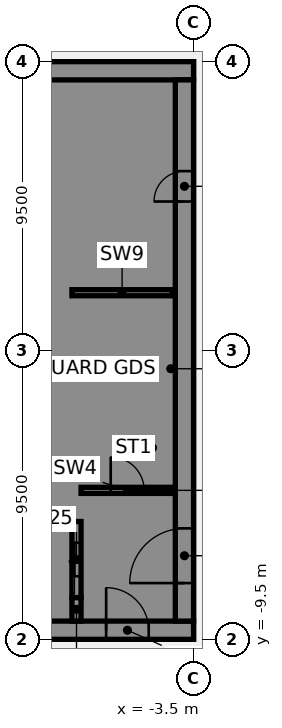
"""IFC4 building model, lengths in metres.
Left out: names, types, materials, properties, quantities, classifications, styles, units other than length and angle.
Written with IfcOpenShell. Run it as: python <this file> out.ifc"""

import sys

from ifc_helpers import new_model, si_unit, direction, frame, frame_2d, origin, place, context, subcontext, project, spatial, polyline, rectangle, outline, extrude, element, fill, save


model = new_model("IFC4")
c1 = context("Model", 3, precision=1e-05, world=origin(), true_north=direction((0.0, 1.0)))
c2 = subcontext(c1, "Body", "Model", "MODEL_VIEW")
j1 = project(units=[si_unit("LENGTHUNIT", "METRE"), si_unit("PLANEANGLEUNIT", "RADIAN")], contexts=[c1])
p1 = place(None, origin())
s1 = spatial("IfcSite", under=j1, at=p1, CompositionType="ELEMENT")
p2 = place(p1, origin())
s2 = spatial("IfcBuilding", under=s1, at=p2, CompositionType="ELEMENT")
p3 = place(p2, frame((0.0, 0.0, 106.0)))
s3 = spatial("IfcBuildingStorey", under=s2, at=p3, CompositionType="ELEMENT", Elevation=106.0)
p4 = place(p3, frame((-16.5, -9.2, 0.0), z_axis=(0.0, 0.0, 1.0), x_axis=(1.0, 0.0, 0.0)))
e1 = element("IfcWall", 1, at=p4, inside=s3, PredefinedType="SHEAR", context=c2, shape_type="SweptSolid", body=[
    extrude(rectangle(XDim=13.0, YDim=0.6, at=frame_2d((6.5, 0.0))), origin(), (0.0, 0.0, 1.0), 3.61),
])
p5 = place(p4, frame((4.15, 0.0, 0.0)))
e2 = element("IfcOpeningElement", 2, at=p5, cuts=e1, PredefinedType="OPENING", context=c2, shape_type="SweptSolid", body=[
    extrude(rectangle(XDim=1.4, YDim=2.1, at=frame_2d((0.7, 1.05))), frame((0.0, 0.31, 0.0), z_axis=(0.0, -1.0, 0.0), x_axis=(1.0, 0.0, 0.0)), (0.0, 0.0, 1.0), 0.62),
])
p6 = place(p4, frame((10.125, 0.0, 0.0)))
e3 = element("IfcOpeningElement", 3, at=p6, cuts=e1, PredefinedType="OPENING", context=c2, shape_type="SweptSolid", body=[
    extrude(rectangle(XDim=1.4, YDim=2.1, at=frame_2d((0.7, 1.05))), frame((0.0, 0.31, 0.0), z_axis=(0.0, -1.0, 0.0), x_axis=(1.0, 0.0, 0.0)), (0.0, 0.0, 1.0), 0.62),
])
p7 = place(p3, frame((-16.5, 9.2, 0.0), z_axis=(0.0, 0.0, 1.0), x_axis=(1.0, 0.0, 0.0)))
e4 = element("IfcWall", 4, at=p7, inside=s3, PredefinedType="SHEAR", context=c2, shape_type="SweptSolid", body=[
    extrude(rectangle(XDim=13.0, YDim=0.6, at=frame_2d((6.5, 0.0))), origin(), (0.0, 0.0, 1.0), 3.61),
])
p8 = place(p3, origin())
e5 = element("IfcWall", 5, at=p8, inside=s3, PredefinedType="SHEAR", context=c2, shape_type="SweptSolid", body=[
    extrude(outline(polyline([(-9.8, -5.375), (-9.8, -5.625), (-7.5, -5.625), (-7.2, -5.625), (-7.2, 8.9), (-7.5, 8.9), (-9.8, 8.9), (-9.8, 8.125), (-7.5, 8.125), (-7.5, 5.625), (-9.8, 5.625), (-9.8, 5.375), (-7.5, 5.375), (-7.5, 2.875), (-9.8, 2.875), (-9.8, 2.625), (-7.5, 2.625), (-7.5, 0.125), (-9.8, 0.125), (-9.8, -0.125), (-7.5, -0.125), (-7.5, -2.625), (-9.8, -2.625), (-9.8, -2.875), (-7.5, -2.875), (-7.5, -5.375), (-9.8, -5.375)])), origin(), (0.0, 0.0, 1.0), 3.61),
])
p9 = place(p3, origin())
e6 = element("IfcWall", 6, at=p9, inside=s3, PredefinedType="SHEAR", context=c2, shape_type="SweptSolid", body=[
    extrude(outline(polyline([(-7.5, -8.125), (-9.55, -8.125), (-9.55, -5.625), (-9.8, -5.625), (-9.8, -8.125), (-9.8, -8.9), (-7.5, -8.9), (-7.5, -8.125)])), origin(), (0.0, 0.0, 1.0), 3.61),
])
p10 = place(p3, frame((-7.35, -8.9, 0.0), z_axis=(0.0, 0.0, 1.0), x_axis=(0.0, 1.0, 0.0)))
e7 = element("IfcWall", 7, at=p10, inside=s3, PredefinedType="SHEAR", context=c2, shape_type="SweptSolid", body=[
    extrude(rectangle(XDim=0.775, YDim=0.3, at=frame_2d((0.387, 0.0))), origin(), (0.0, 0.0, 1.0), 3.61),
])
p11 = place(p3, frame((-7.5, 1.9, 0.0), z_axis=(0.0, 0.0, 1.0), x_axis=(1.0, 0.0, 0.0)))
e8 = element("IfcWall", 8, at=p11, inside=s3, PredefinedType="SHEAR", context=c2, shape_type="SweptSolid", body=[
    extrude(rectangle(XDim=3.3, YDim=0.2, at=frame_2d((1.65, 0.0))), origin(), (0.0, 0.0, 1.0), 3.61),
])
p12 = place(p3, frame((-7.35, -8.125, 0.0), z_axis=(0.0, 0.0, 1.0), x_axis=(0.0, 1.0, 0.0)))
e9 = element("IfcWall", 9, at=p12, inside=s3, PredefinedType="SHEAR", context=c2, shape_type="SweptSolid", body=[
    extrude(rectangle(XDim=2.5, YDim=0.3, at=frame_2d((1.25, 0.0))), origin(), (0.0, 0.0, 1.0), 3.61),
])
p13 = place(p12, frame((0.7, 0.0, 0.0)))
e10 = element("IfcOpeningElement", 10, at=p13, cuts=e9, PredefinedType="OPENING", context=c2, shape_type="SweptSolid", body=[
    extrude(rectangle(XDim=1.1, YDim=2.1, at=frame_2d((0.55, 1.05))), frame((0.0, 0.16, 0.0), z_axis=(0.0, -1.0, 0.0), x_axis=(1.0, 0.0, 0.0)), (0.0, 0.0, 1.0), 0.32),
])
p14 = place(p3, frame((-3.8, -8.9, 0.0), z_axis=(0.0, 0.0, 1.0), x_axis=(0.0, 1.0, 0.0)))
e11 = element("IfcWall", 11, at=p14, inside=s3, PredefinedType="SHEAR", context=c2, shape_type="SweptSolid", body=[
    extrude(rectangle(XDim=17.8, YDim=0.6, at=frame_2d((8.9, 0.0))), origin(), (0.0, 0.0, 1.0), 3.61),
])
p15 = place(p14, frame((1.25, 0.0, 0.0)))
e12 = element("IfcOpeningElement", 12, at=p15, cuts=e11, PredefinedType="OPENING", context=c2, shape_type="SweptSolid", body=[
    extrude(rectangle(XDim=1.8, YDim=2.1, at=frame_2d((0.9, 1.05))), frame((0.0, 0.31, 0.0), z_axis=(0.0, -1.0, 0.0), x_axis=(1.0, 0.0, 0.0)), (0.0, 0.0, 1.0), 0.62),
])
p16 = place(p14, frame((13.8, 0.0, 0.0)))
e13 = element("IfcOpeningElement", 13, at=p16, cuts=e11, PredefinedType="OPENING", context=c2, shape_type="SweptSolid", body=[
    extrude(rectangle(XDim=1.0, YDim=2.1, at=frame_2d((0.5, 1.05))), frame((0.0, 0.31, 0.0), z_axis=(0.0, -1.0, 0.0), x_axis=(1.0, 0.0, 0.0)), (0.0, 0.0, 1.0), 0.62),
])
p17 = place(p3, frame((-7.2, -4.6, 0.0), z_axis=(0.0, 0.0, 1.0), x_axis=(1.0, 0.0, 0.0)))
e14 = element("IfcWall", 14, at=p17, inside=s3, PredefinedType="SHEAR", context=c2, shape_type="SweptSolid", body=[
    extrude(rectangle(XDim=3.1, YDim=0.2, at=frame_2d((1.55, 0.0))), origin(), (0.0, 0.0, 1.0), 3.61),
])
p18 = place(p17, frame((0.975, 0.0, 0.0)))
e15 = element("IfcOpeningElement", 15, at=p18, cuts=e14, PredefinedType="OPENING", context=c2, shape_type="SweptSolid", body=[
    extrude(rectangle(XDim=1.1, YDim=2.1, at=frame_2d((0.55, 1.05))), frame((0.0, 0.11, 0.0), z_axis=(0.0, -1.0, 0.0), x_axis=(1.0, 0.0, 0.0)), (0.0, 0.0, 1.0), 0.22),
])
p19 = place(p6, origin())
e16 = element("IfcDoor", 16, at=p19, inside=s3, OperationType="SINGLE_SWING_LEFT", PredefinedType="DOOR", context=c2, shape_type="SweptSolid", body=[
    extrude(rectangle(XDim=1.4, YDim=2.1, at=frame_2d((0.7, 1.05))), frame((0.0, 0.025, 0.0), z_axis=(0.0, -1.0, 0.0), x_axis=(1.0, 0.0, 0.0)), (0.0, 0.0, 1.0), 0.05),
])
fill(e3, e16)
p20 = place(p15, origin())
e17 = element("IfcDoor", 17, at=p20, inside=s3, OperationType="SINGLE_SWING_LEFT", PredefinedType="DOOR", context=c2, shape_type="SweptSolid", body=[
    extrude(rectangle(XDim=1.8, YDim=2.1, at=frame_2d((0.9, 1.05))), frame((0.0, 0.025, 0.0), z_axis=(0.0, -1.0, 0.0), x_axis=(1.0, 0.0, 0.0)), (0.0, 0.0, 1.0), 0.05),
])
fill(e12, e17)
p21 = place(p16, origin())
e18 = element("IfcDoor", 18, at=p21, inside=s3, OperationType="SINGLE_SWING_LEFT", PredefinedType="DOOR", context=c2, shape_type="SweptSolid", body=[
    extrude(rectangle(XDim=1.0, YDim=2.1, at=frame_2d((0.5, 1.05))), frame((0.0, 0.025, 0.0), z_axis=(0.0, -1.0, 0.0), x_axis=(1.0, 0.0, 0.0)), (0.0, 0.0, 1.0), 0.05),
])
fill(e13, e18)
p22 = place(p18, origin())
e19 = element("IfcDoor", 19, at=p22, inside=s3, OperationType="SINGLE_SWING_LEFT", PredefinedType="DOOR", context=c2, shape_type="SweptSolid", body=[
    extrude(rectangle(XDim=1.1, YDim=2.1, at=frame_2d((0.55, 1.05))), frame((0.0, 0.025, 0.0), z_axis=(0.0, -1.0, 0.0), x_axis=(1.0, 0.0, 0.0)), (0.0, 0.0, 1.0), 0.05),
])
fill(e15, e19)
p23 = place(p13, origin())
e20 = element("IfcDoor", 20, at=p23, inside=s3, OperationType="SLIDING_TO_LEFT", PredefinedType="DOOR", context=c2, shape_type="SweptSolid", body=[
    extrude(rectangle(XDim=1.1, YDim=2.1, at=frame_2d((0.55, 1.05))), frame((0.0, 0.025, 0.0), z_axis=(0.0, -1.0, 0.0), x_axis=(1.0, 0.0, 0.0)), (0.0, 0.0, 1.0), 0.05),
])
fill(e10, e20)
save(model, sys.argv[1])
